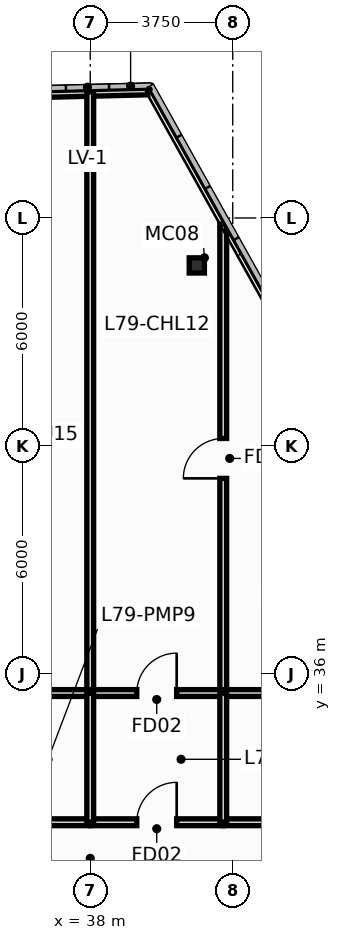
"""IFC4 building model, lengths in metres.
Left out: names, types, materials, properties, quantities, classifications, styles, units other than length and angle.
Written with IfcOpenShell. Run it as: python <this file> out.ifc"""

import sys

from ifc_helpers import new_model, si_unit, direction, frame, frame_2d, origin, origin_2d, place, context, subcontext, project, spatial, rectangle, hollow_rectangle, extrude, source, transform, mapped, element, fill, save


model = new_model("IFC4")
c1 = context("Model", 3, precision=1e-05, world=origin(), true_north=direction((0.0, 1.0)))
c2 = subcontext(c1, "Body", "Model", "MODEL_VIEW")
j1 = project(units=[si_unit("LENGTHUNIT", "METRE"), si_unit("PLANEANGLEUNIT", "RADIAN")], contexts=[c1])
p1 = place(None, origin())
s1 = spatial("IfcSite", under=j1, at=p1, CompositionType="ELEMENT")
p2 = place(p1, origin())
s2 = spatial("IfcBuilding", under=s1, at=p2, CompositionType="ELEMENT")
p3 = place(p2, frame((0.0, 0.0, 300.0)))
s3 = spatial("IfcBuildingStorey", under=s2, at=p3, CompositionType="ELEMENT", Elevation=300.0)
m1 = source(origin(), c2, "Body", "SweptSolid", [
    extrude(hollow_rectangle(XDim=0.4, YDim=0.4, WallThickness=0.016, at=origin_2d()), origin(), (0.0, 0.0, 1.0), 3.396),
])
p4 = place(p3, frame((40.804, 46.751, 0.0), z_axis=(-0.019339141509, 0.001365961668, 0.999812048214), x_axis=(-0.07045643972, -0.997514857083, 0.0)))
e1 = element("IfcColumn", 1, at=p4, inside=s3, PredefinedType="COLUMN", context=c2, shape_type="MappedRepresentation", body=[
    mapped(m1, transform((0.0, 0.0, 0.0), scale=1.0)),
])
p5 = place(p3, frame((36.341, 51.292, 0.0), z_axis=(0.0, 0.0, 1.0), x_axis=(0.999692817097, 0.024784500085, 0.0)))
e2 = element("IfcWall", 2, at=p5, inside=s3, PredefinedType="STANDARD", context=c2, shape_type="SweptSolid", body=[
    extrude(rectangle(XDim=3.172, YDim=0.26, at=frame_2d((1.586, 0.0))), origin(), (0.0, 0.0, 1.0), 3.15),
])
p6 = place(p3, frame((38.0, 35.505, 0.0), z_axis=(0.0, 0.0, 1.0), x_axis=(0.0, 1.0, 0.0)))
e3 = element("IfcWall", 3, at=p6, inside=s3, PredefinedType="PARTITIONING", context=c2, shape_type="SweptSolid", body=[
    extrude(rectangle(XDim=15.815, YDim=0.18, at=frame_2d((7.908, 0.0))), origin(), (0.0, 0.0, 1.0), 3.15),
])
p7 = place(p3, frame((41.5, 35.505, 0.0), z_axis=(0.0, 0.0, 1.0), x_axis=(0.0, 1.0, 0.0)))
e4 = element("IfcWall", 4, at=p7, inside=s3, PredefinedType="PARTITIONING", context=c2, shape_type="SweptSolid", body=[
    extrude(rectangle(XDim=12.335, YDim=0.18, at=frame_2d((6.167, 0.0))), origin(), (0.0, 0.0, 1.0), 2.735),
])
p8 = place(p7, frame((5.643, 0.0, 0.0)))
e5 = element("IfcOpeningElement", 5, at=p8, cuts=e4, PredefinedType="OPENING", context=c2, shape_type="SweptSolid", body=[
    extrude(rectangle(XDim=1.05, YDim=2.15, at=frame_2d((0.525, 1.075))), frame((0.0, 0.102, 0.0), z_axis=(0.0, -1.0, 0.0), x_axis=(1.0, 0.0, 0.0)), (0.0, 0.0, 1.0), 0.204),
])
p9 = place(p3, frame((41.505, 32.1, 0.0), z_axis=(0.0, 0.0, 1.0), x_axis=(1.0, 0.0, 0.0)))
e6 = element("IfcWall", 6, at=p9, inside=s3, PredefinedType="PARTITIONING", context=c2, shape_type="SweptSolid", body=[
    extrude(rectangle(XDim=8.785, YDim=0.18, at=frame_2d((4.393, 0.0))), origin(), (0.0, 0.0, 1.0), 2.835),
])
p10 = place(p9, frame((3.867, 0.0, 0.0)))
e7 = element("IfcOpeningElement", 7, at=p10, cuts=e6, PredefinedType="OPENING", context=c2, shape_type="SweptSolid", body=[
    extrude(rectangle(XDim=1.05, YDim=2.15, at=frame_2d((0.525, 1.075))), frame((0.0, 0.102, 0.0), z_axis=(0.0, -1.0, 0.0), x_axis=(1.0, 0.0, 0.0)), (0.0, 0.0, 1.0), 0.204),
])
p11 = place(p3, frame((41.505, 35.5, 0.0), z_axis=(0.0, 0.0, 1.0), x_axis=(1.0, 0.0, 0.0)))
e8 = element("IfcWall", 8, at=p11, inside=s3, PredefinedType="PARTITIONING", context=c2, shape_type="SweptSolid", body=[
    extrude(rectangle(XDim=6.885, YDim=0.18, at=frame_2d((3.442, 0.0))), origin(), (0.0, 0.0, 1.0), 3.15),
])
p12 = place(p3, frame((34.505, 32.1, 0.0), z_axis=(0.0, 0.0, 1.0), x_axis=(1.0, 0.0, 0.0)))
e9 = element("IfcWall", 9, at=p12, inside=s3, PredefinedType="PARTITIONING", context=c2, shape_type="SweptSolid", body=[
    extrude(rectangle(XDim=3.49, YDim=0.18, at=frame_2d((1.745, 0.0))), origin(), (0.0, 0.0, 1.0), 2.835),
])
p13 = place(p12, frame((1.22, 0.0, 0.0)))
e10 = element("IfcOpeningElement", 10, at=p13, cuts=e9, PredefinedType="OPENING", context=c2, shape_type="SweptSolid", body=[
    extrude(rectangle(XDim=1.05, YDim=2.15, at=frame_2d((0.525, 1.075))), frame((0.0, 0.102, 0.0), z_axis=(0.0, -1.0, 0.0), x_axis=(1.0, 0.0, 0.0)), (0.0, 0.0, 1.0), 0.204),
])
p14 = place(p3, frame((38.005, 32.1, 0.0), z_axis=(0.0, 0.0, 1.0), x_axis=(1.0, 0.0, 0.0)))
e11 = element("IfcWall", 11, at=p14, inside=s3, PredefinedType="PARTITIONING", context=c2, shape_type="SweptSolid", body=[
    extrude(rectangle(XDim=3.49, YDim=0.18, at=frame_2d((1.745, 0.0))), origin(), (0.0, 0.0, 1.0), 2.835),
])
p15 = place(p14, frame((1.22, 0.0, 0.0)))
e12 = element("IfcOpeningElement", 12, at=p15, cuts=e11, PredefinedType="OPENING", context=c2, shape_type="SweptSolid", body=[
    extrude(rectangle(XDim=1.05, YDim=2.15, at=frame_2d((0.525, 1.075))), frame((0.0, 0.102, 0.0), z_axis=(0.0, -1.0, 0.0), x_axis=(1.0, 0.0, 0.0)), (0.0, 0.0, 1.0), 0.204),
])
p16 = place(p3, frame((34.505, 35.5, 0.0), z_axis=(0.0, 0.0, 1.0), x_axis=(1.0, 0.0, 0.0)))
e13 = element("IfcWall", 13, at=p16, inside=s3, PredefinedType="PARTITIONING", context=c2, shape_type="SweptSolid", body=[
    extrude(rectangle(XDim=3.49, YDim=0.18, at=frame_2d((1.745, 0.0))), origin(), (0.0, 0.0, 1.0), 3.15),
])
p17 = place(p16, frame((1.22, 0.0, 0.0)))
e14 = element("IfcOpeningElement", 14, at=p17, cuts=e13, PredefinedType="OPENING", context=c2, shape_type="SweptSolid", body=[
    extrude(rectangle(XDim=1.05, YDim=2.15, at=frame_2d((0.525, 1.075))), frame((0.0, 0.102, 0.0), z_axis=(0.0, -1.0, 0.0), x_axis=(1.0, 0.0, 0.0)), (0.0, 0.0, 1.0), 0.204),
])
p18 = place(p3, frame((38.005, 35.5, 0.0), z_axis=(0.0, 0.0, 1.0), x_axis=(1.0, 0.0, 0.0)))
e15 = element("IfcWall", 15, at=p18, inside=s3, PredefinedType="PARTITIONING", context=c2, shape_type="SweptSolid", body=[
    extrude(rectangle(XDim=3.49, YDim=0.18, at=frame_2d((1.745, 0.0))), origin(), (0.0, 0.0, 1.0), 3.15),
])
p19 = place(p18, frame((1.22, 0.0, 0.0)))
e16 = element("IfcOpeningElement", 16, at=p19, cuts=e15, PredefinedType="OPENING", context=c2, shape_type="SweptSolid", body=[
    extrude(rectangle(XDim=1.05, YDim=2.15, at=frame_2d((0.525, 1.075))), frame((0.0, 0.102, 0.0), z_axis=(0.0, -1.0, 0.0), x_axis=(1.0, 0.0, 0.0)), (0.0, 0.0, 1.0), 0.204),
])
for number, where, z_axis, x_axis in (
    (17, (38.0, 32.105, 0.0), (0.0, 0.0, 1.0), (0.0, 1.0, 0.0)),
    (18, (41.5, 32.105, 0.0), (0.0, 0.0, 1.0), (0.0, 1.0, 0.0)),
):
    element("IfcWall", number, at=place(p3, frame(where, z_axis=z_axis, x_axis=x_axis)), inside=s3, PredefinedType="PARTITIONING", context=c2, shape_type="SweptSolid", body=[
        extrude(rectangle(XDim=3.39, YDim=0.18, at=frame_2d((1.695, 0.0))), origin(), (0.0, 0.0, 1.0), 3.15),
    ])
p20 = place(p8, origin())
e19 = element("IfcDoor", 19, at=p20, inside=s3, OperationType="SINGLE_SWING_LEFT", PredefinedType="DOOR", context=c2, shape_type="SweptSolid", body=[
    extrude(rectangle(XDim=1.05, YDim=2.15, at=frame_2d((0.525, 1.075))), frame((0.0, 0.025, 0.0), z_axis=(0.0, -1.0, 0.0), x_axis=(1.0, 0.0, 0.0)), (0.0, 0.0, 1.0), 0.05),
])
fill(e5, e19)
p21 = place(p15, origin())
e20 = element("IfcDoor", 20, at=p21, inside=s3, OperationType="SINGLE_SWING_RIGHT", PredefinedType="DOOR", context=c2, shape_type="SweptSolid", body=[
    extrude(rectangle(XDim=1.05, YDim=2.15, at=frame_2d((0.525, 1.075))), frame((0.0, 0.025, 0.0), z_axis=(0.0, -1.0, 0.0), x_axis=(1.0, 0.0, 0.0)), (0.0, 0.0, 1.0), 0.05),
])
fill(e12, e20)
p22 = place(p19, origin())
e21 = element("IfcDoor", 21, at=p22, inside=s3, OperationType="SINGLE_SWING_RIGHT", PredefinedType="DOOR", context=c2, shape_type="SweptSolid", body=[
    extrude(rectangle(XDim=1.05, YDim=2.15, at=frame_2d((0.525, 1.075))), frame((0.0, 0.025, 0.0), z_axis=(0.0, -1.0, 0.0), x_axis=(1.0, 0.0, 0.0)), (0.0, 0.0, 1.0), 0.05),
])
fill(e16, e21)
save(model, sys.argv[1])
